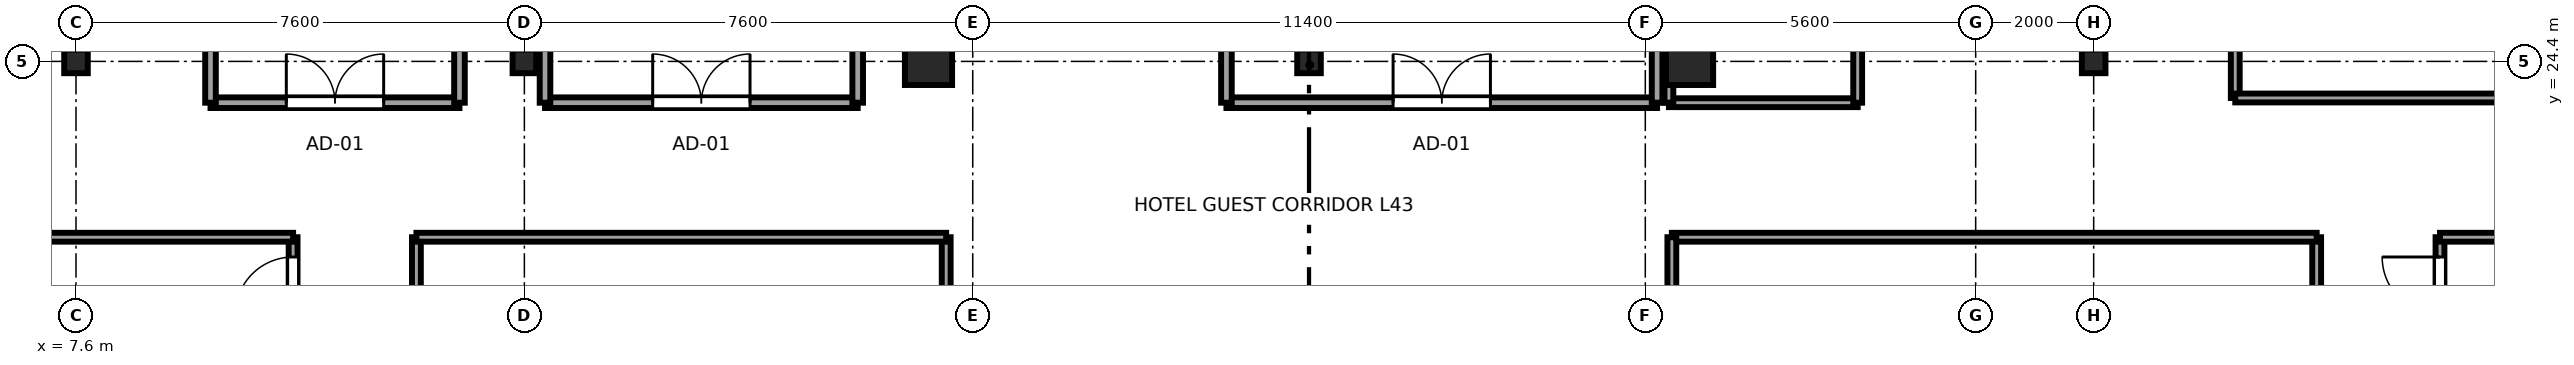
"""IFC4 building model, lengths in metres.
Left out: names, types, materials, properties, quantities, classifications, styles, units other than length and angle.
Written with IfcOpenShell. Run it as: python <this file> out.ifc"""

import sys

from ifc_helpers import new_model, si_unit, direction, frame, frame_2d, origin, origin_2d, place, context, subcontext, project, spatial, rectangle, i_section, extrude, source, transform, mapped, element, fill, save


model = new_model("IFC4")
c1 = context("Model", 3, precision=1e-05, world=origin(), true_north=direction((0.0, 1.0)))
c2 = subcontext(c1, "Body", "Model", "MODEL_VIEW")
j1 = project(units=[si_unit("LENGTHUNIT", "METRE"), si_unit("PLANEANGLEUNIT", "RADIAN")], contexts=[c1])
p1 = place(None, origin())
s1 = spatial("IfcSite", under=j1, at=p1, CompositionType="ELEMENT")
p2 = place(p1, origin())
s2 = spatial("IfcBuilding", under=s1, at=p2, CompositionType="ELEMENT")
p3 = place(p2, frame((0.0, 0.0, 164.8)))
s3 = spatial("IfcBuildingStorey", under=s2, at=p3, CompositionType="ELEMENT", Elevation=164.8)
m1 = source(origin(), c2, "Body", "SweptSolid", [
    extrude(i_section(OverallWidth=0.4, OverallDepth=0.4, WebThickness=0.02, FlangeThickness=0.035, at=origin_2d()), origin(), (0.0, 0.0, 1.0), 3.55),
])
for number, where, z_axis, x_axis in (
    (1, (7.6, 24.4, 0.0), (0.0, 0.0, 1.0), (1.0, 0.0, 0.0)),
    (2, (15.2, 24.4, 0.0), (0.0, 0.0, 1.0), (1.0, 0.0, 0.0)),
):
    element("IfcColumn", number, at=place(p3, frame(where, z_axis=z_axis, x_axis=x_axis)), inside=s3, PredefinedType="COLUMN", context=c2, shape_type="MappedRepresentation", body=[
        mapped(m1, transform((0.0, 0.0, 0.0), x_axis=(1.0, 0.0, 0.0), y_axis=(0.0, 1.0, 0.0), z_axis=(0.0, 0.0, 1.0), scale=1.0)),
    ])
m2 = source(origin(), c2, "Body", "SweptSolid", [
    extrude(rectangle(XDim=0.8, YDim=0.8, at=origin_2d()), origin(), (0.0, 0.0, 1.0), 3.55),
])
for number, where, z_axis, x_axis in (
    (3, (22.05, 24.4, 0.0), (0.0, 0.0, 1.0), (1.0, 0.0, 0.0)),
    (4, (34.95, 24.4, 0.0), (0.0, 0.0, 1.0), (1.0, 0.0, 0.0)),
):
    element("IfcColumn", number, at=place(p3, frame(where, z_axis=z_axis, x_axis=x_axis)), inside=s3, PredefinedType="COLUMN", context=c2, shape_type="MappedRepresentation", body=[
        mapped(m2, transform((0.0, 0.0, 0.0), x_axis=(1.0, 0.0, 0.0), y_axis=(0.0, 1.0, 0.0), z_axis=(0.0, 0.0, 1.0), scale=1.0)),
    ])
for number, where, z_axis, x_axis in (
    (5, (41.8, 24.4, 0.0), (0.0, 0.0, 1.0), (1.0, 0.0, 0.0)),
    (6, (28.5, 24.4, 0.0), (0.0, 0.0, 1.0), (1.0, 0.0, 0.0)),
):
    element("IfcColumn", number, at=place(p3, frame(where, z_axis=z_axis, x_axis=x_axis)), inside=s3, PredefinedType="COLUMN", context=c2, shape_type="MappedRepresentation", body=[
        mapped(m1, transform((0.0, 0.0, 0.0), x_axis=(1.0, 0.0, 0.0), y_axis=(0.0, 1.0, 0.0), z_axis=(0.0, 0.0, 1.0), scale=1.0)),
    ])
p4 = place(p3, frame((11.28, 19.81, 0.0), z_axis=(0.0, 0.0, 1.0), x_axis=(0.0, 1.0, 0.0)))
e7 = element("IfcWall", 7, at=p4, inside=s3, PredefinedType="PARTITIONING", context=c2, shape_type="SweptSolid", body=[
    extrude(rectangle(XDim=1.61, YDim=0.15, at=frame_2d((0.805, 0.0))), origin(), (0.0, 0.0, 1.0), 3.001),
])
p5 = place(p4, frame((0.295, 0.0, 0.0)))
e8 = element("IfcOpeningElement", 8, at=p5, cuts=e7, PredefinedType="OPENING", context=c2, shape_type="SweptSolid", body=[
    extrude(rectangle(XDim=0.98, YDim=2.12, at=frame_2d((0.49, 1.06))), frame((0.0, 0.085, 0.0), z_axis=(0.0, -1.0, 0.0), x_axis=(1.0, 0.0, 0.0)), (0.0, 0.0, 1.0), 0.17),
])
p6 = place(p3, frame((3.005, 21.42, 0.0), z_axis=(0.0, 0.0, 1.0), x_axis=(1.0, 0.0, 0.0)))
e9 = element("IfcWall", 9, at=p6, inside=s3, PredefinedType="PARTITIONING", context=c2, shape_type="SweptSolid", body=[
    extrude(rectangle(XDim=8.275, YDim=0.15, at=frame_2d((4.138, 0.0))), origin(), (0.0, 0.0, 1.0), 3.37),
])
p7 = place(p3, frame((13.37, 18.81, 0.0), z_axis=(0.0, 0.0, 1.0), x_axis=(0.0, 1.0, 0.0)))
e10 = element("IfcWall", 10, at=p7, inside=s3, PredefinedType="PARTITIONING", context=c2, shape_type="SweptSolid", body=[
    extrude(rectangle(XDim=2.61, YDim=0.15, at=frame_2d((1.305, 0.0))), origin(), (0.0, 0.0, 1.0), 3.37),
])
p8 = place(p7, frame((0.795, 0.0, 0.0)))
e11 = element("IfcOpeningElement", 11, at=p8, cuts=e10, PredefinedType="OPENING", context=c2, shape_type="SweptSolid", body=[
    extrude(rectangle(XDim=0.98, YDim=2.12, at=frame_2d((0.49, 1.06))), frame((0.0, 0.085, 0.0), z_axis=(0.0, -1.0, 0.0), x_axis=(1.0, 0.0, 0.0)), (0.0, 0.0, 1.0), 0.17),
])
p9 = place(p3, frame((22.35, 16.88, 0.0), z_axis=(0.0, 0.0, 1.0), x_axis=(0.0, 1.0, 0.0)))
e12 = element("IfcWall", 12, at=p9, inside=s3, PredefinedType="PARTITIONING", context=c2, shape_type="SweptSolid", body=[
    extrude(rectangle(XDim=4.54, YDim=0.15, at=frame_2d((2.27, 0.0))), origin(), (0.0, 0.0, 1.0), 3.37),
])
p10 = place(p3, frame((13.37, 21.42, 0.0), z_axis=(0.0, 0.0, 1.0), x_axis=(1.0, 0.0, 0.0)))
e13 = element("IfcWall", 13, at=p10, inside=s3, PredefinedType="PARTITIONING", context=c2, shape_type="SweptSolid", body=[
    extrude(rectangle(XDim=8.98, YDim=0.15, at=frame_2d((4.49, 0.0))), origin(), (0.0, 0.0, 1.0), 3.37),
])
p11 = place(p3, frame((45.58, 18.81, 0.0), z_axis=(0.0, 0.0, 1.0), x_axis=(0.0, 1.0, 0.0)))
e14 = element("IfcWall", 14, at=p11, inside=s3, PredefinedType="PARTITIONING", context=c2, shape_type="SweptSolid", body=[
    extrude(rectangle(XDim=2.61, YDim=0.15, at=frame_2d((1.305, 0.0))), origin(), (0.0, 0.0, 1.0), 3.001),
])
p12 = place(p11, frame((0.795, 0.0, 0.0)))
e15 = element("IfcOpeningElement", 15, at=p12, cuts=e14, PredefinedType="OPENING", context=c2, shape_type="SweptSolid", body=[
    extrude(rectangle(XDim=0.98, YDim=2.12, at=frame_2d((0.49, 1.06))), frame((0.0, 0.085, 0.0), z_axis=(0.0, -1.0, 0.0), x_axis=(1.0, 0.0, 0.0)), (0.0, 0.0, 1.0), 0.17),
])
p13 = place(p3, frame((34.65, 21.42, 0.0), z_axis=(0.0, 0.0, 1.0), x_axis=(1.0, 0.0, 0.0)))
e16 = element("IfcWall", 16, at=p13, inside=s3, PredefinedType="PARTITIONING", context=c2, shape_type="SweptSolid", body=[
    extrude(rectangle(XDim=10.93, YDim=0.15, at=frame_2d((5.465, 0.0))), origin(), (0.0, 0.0, 1.0), 3.37),
])
p14 = place(p3, frame((34.65, 16.88, 0.0), z_axis=(0.0, 0.0, 1.0), x_axis=(0.0, 1.0, 0.0)))
e17 = element("IfcWall", 17, at=p14, inside=s3, PredefinedType="PARTITIONING", context=c2, shape_type="SweptSolid", body=[
    extrude(rectangle(XDim=4.54, YDim=0.15, at=frame_2d((2.27, 0.0))), origin(), (0.0, 0.0, 1.0), 3.37),
])
p15 = place(p3, frame((47.67, 19.81, 0.0), z_axis=(0.0, 0.0, 1.0), x_axis=(0.0, 1.0, 0.0)))
e18 = element("IfcWall", 18, at=p15, inside=s3, PredefinedType="PARTITIONING", context=c2, shape_type="SweptSolid", body=[
    extrude(rectangle(XDim=1.61, YDim=0.15, at=frame_2d((0.805, 0.0))), origin(), (0.0, 0.0, 1.0), 3.37),
])
p16 = place(p15, frame((0.295, 0.0, 0.0)))
e19 = element("IfcOpeningElement", 19, at=p16, cuts=e18, PredefinedType="OPENING", context=c2, shape_type="SweptSolid", body=[
    extrude(rectangle(XDim=0.98, YDim=2.12, at=frame_2d((0.49, 1.06))), frame((0.0, 0.085, 0.0), z_axis=(0.0, -1.0, 0.0), x_axis=(1.0, 0.0, 0.0)), (0.0, 0.0, 1.0), 0.17),
])
p17 = place(p3, frame((47.67, 21.42, 0.0), z_axis=(0.0, 0.0, 1.0), x_axis=(1.0, 0.0, 0.0)))
e20 = element("IfcWall", 20, at=p17, inside=s3, PredefinedType="PARTITIONING", context=c2, shape_type="SweptSolid", body=[
    extrude(rectangle(XDim=6.325, YDim=0.15, at=frame_2d((3.163, 0.0))), origin(), (0.0, 0.0, 1.0), 3.37),
])
p18 = place(p3, frame((44.2, 23.78, 0.0), z_axis=(0.0, 0.0, 1.0), x_axis=(0.0, 1.0, 0.0)))
e21 = element("IfcWall", 21, at=p18, inside=s3, PredefinedType="PARTITIONING", context=c2, shape_type="SweptSolid", body=[
    extrude(rectangle(XDim=7.34, YDim=0.15, at=frame_2d((3.67, 0.0))), origin(), (0.0, 0.0, 1.0), 3.37),
])
p19 = place(p18, frame((3.18, 0.0, 0.0)))
e22 = element("IfcOpeningElement", 22, at=p19, cuts=e21, PredefinedType="OPENING", context=c2, shape_type="SweptSolid", body=[
    extrude(rectangle(XDim=0.98, YDim=2.12, at=frame_2d((0.49, 1.06))), frame((0.0, 0.085, 0.0), z_axis=(0.0, -1.0, 0.0), x_axis=(1.0, 0.0, 0.0)), (0.0, 0.0, 1.0), 0.17),
])
p20 = place(p3, frame((44.2, 23.78, 0.0), z_axis=(0.0, 0.0, 1.0), x_axis=(1.0, 0.0, 0.0)))
e23 = element("IfcWall", 23, at=p20, inside=s3, PredefinedType="PARTITIONING", context=c2, shape_type="SweptSolid", body=[
    extrude(rectangle(XDim=9.795, YDim=0.15, at=frame_2d((4.897, 0.0))), origin(), (0.0, 0.0, 1.0), 3.37),
])
p21 = place(p3, frame((9.88, 23.7, 0.0), z_axis=(0.0, 0.0, 1.0), x_axis=(1.0, 0.0, 0.0)))
e24 = element("IfcWall", 24, at=p21, inside=s3, PredefinedType="PARTITIONING", context=c2, shape_type="SweptSolid", body=[
    extrude(rectangle(XDim=4.22, YDim=0.18, at=frame_2d((2.11, 0.0))), origin(), (0.0, 0.0, 1.0), 3.37),
])
p22 = place(p21, frame((1.285, 0.0, 0.0)))
e25 = element("IfcOpeningElement", 25, at=p22, cuts=e24, PredefinedType="OPENING", context=c2, shape_type="SweptSolid", body=[
    extrude(rectangle(XDim=1.65, YDim=2.15, at=frame_2d((0.825, 1.075))), frame((0.0, 0.1, 0.0), z_axis=(0.0, -1.0, 0.0), x_axis=(1.0, 0.0, 0.0)), (0.0, 0.0, 1.0), 0.2),
])
for number, where, z_axis, x_axis in (
    (26, (9.88, 23.7, 0.0), (0.0, 0.0, 1.0), (0.0, 1.0, 0.0)),
    (27, (14.1, 23.7, 0.0), (0.0, 0.0, 1.0), (0.0, 1.0, 0.0)),
):
    element("IfcWall", number, at=place(p3, frame(where, z_axis=z_axis, x_axis=x_axis)), inside=s3, PredefinedType="PARTITIONING", context=c2, shape_type="SweptSolid", body=[
        extrude(rectangle(XDim=6.05, YDim=0.18, at=frame_2d((3.025, 0.0))), origin(), (0.0, 0.0, 1.0), 3.37),
    ])
p23 = place(p3, frame((27.1, 23.7, 0.0), z_axis=(0.0, 0.0, 1.0), x_axis=(1.0, 0.0, 0.0)))
e28 = element("IfcWall", 28, at=p23, inside=s3, PredefinedType="PARTITIONING", context=c2, shape_type="SweptSolid", body=[
    extrude(rectangle(XDim=7.3, YDim=0.18, at=frame_2d((3.65, 0.0))), origin(), (0.0, 0.0, 1.0), 3.37),
])
p24 = place(p23, frame((2.825, 0.0, 0.0)))
e29 = element("IfcOpeningElement", 29, at=p24, cuts=e28, PredefinedType="OPENING", context=c2, shape_type="SweptSolid", body=[
    extrude(rectangle(XDim=1.65, YDim=2.15, at=frame_2d((0.825, 1.075))), frame((0.0, 0.1, 0.0), z_axis=(0.0, -1.0, 0.0), x_axis=(1.0, 0.0, 0.0)), (0.0, 0.0, 1.0), 0.2),
])
for number, where, z_axis, x_axis in (
    (30, (27.1, 23.7, 0.0), (0.0, 0.0, 1.0), (0.0, 1.0, 0.0)),
    (31, (34.4, 23.7, 0.0), (0.0, 0.0, 1.0), (0.0, 1.0, 0.0)),
):
    element("IfcWall", number, at=place(p3, frame(where, z_axis=z_axis, x_axis=x_axis)), inside=s3, PredefinedType="PARTITIONING", context=c2, shape_type="SweptSolid", body=[
        extrude(rectangle(XDim=6.1, YDim=0.18, at=frame_2d((3.05, 0.0))), origin(), (0.0, 0.0, 1.0), 3.37),
    ])
p25 = place(p3, frame((15.55, 23.7, 0.0), z_axis=(0.0, 0.0, 1.0), x_axis=(1.0, 0.0, 0.0)))
e32 = element("IfcWall", 32, at=p25, inside=s3, PredefinedType="PARTITIONING", context=c2, shape_type="SweptSolid", body=[
    extrude(rectangle(XDim=5.3, YDim=0.18, at=frame_2d((2.65, 0.0))), origin(), (0.0, 0.0, 1.0), 3.37),
])
p26 = place(p25, frame((1.825, 0.0, 0.0)))
e33 = element("IfcOpeningElement", 33, at=p26, cuts=e32, PredefinedType="OPENING", context=c2, shape_type="SweptSolid", body=[
    extrude(rectangle(XDim=1.65, YDim=2.15, at=frame_2d((0.825, 1.075))), frame((0.0, 0.1, 0.0), z_axis=(0.0, -1.0, 0.0), x_axis=(1.0, 0.0, 0.0)), (0.0, 0.0, 1.0), 0.2),
])
for number, where, z_axis, x_axis in (
    (34, (15.55, 23.7, 0.0), (0.0, 0.0, 1.0), (0.0, 1.0, 0.0)),
    (35, (20.85, 23.7, 0.0), (0.0, 0.0, 1.0), (0.0, 1.0, 0.0)),
):
    element("IfcWall", number, at=place(p3, frame(where, z_axis=z_axis, x_axis=x_axis)), inside=s3, PredefinedType="PARTITIONING", context=c2, shape_type="SweptSolid", body=[
        extrude(rectangle(XDim=6.1, YDim=0.18, at=frame_2d((3.05, 0.0))), origin(), (0.0, 0.0, 1.0), 3.37),
    ])
p27 = place(p3, frame((34.6, 23.7, 0.0), z_axis=(0.0, 0.0, 1.0), x_axis=(1.0, 0.0, 0.0)))
e36 = element("IfcWall", 36, at=p27, inside=s3, PredefinedType="PARTITIONING", context=c2, shape_type="SweptSolid", body=[
    extrude(rectangle(XDim=3.2, YDim=0.15, at=frame_2d((1.6, 0.0))), origin(), (0.0, 0.0, 1.0), 3.37),
])
for number, where, z_axis, x_axis in (
    (37, (34.6, 23.7, 0.0), (0.0, 0.0, 1.0), (0.0, 1.0, 0.0)),
    (38, (37.8, 23.7, 0.0), (0.0, 0.0, 1.0), (0.0, 1.0, 0.0)),
):
    element("IfcWall", number, at=place(p3, frame(where, z_axis=z_axis, x_axis=x_axis)), inside=s3, PredefinedType="PARTITIONING", context=c2, shape_type="SweptSolid", body=[
        extrude(rectangle(XDim=5.7, YDim=0.15, at=frame_2d((2.85, 0.0))), origin(), (0.0, 0.0, 1.0), 3.37),
    ])
m3 = source(origin(), c2, "Body", "SweptSolid", [
    extrude(rectangle(XDim=0.98, YDim=2.12, at=frame_2d((0.49, 1.06))), frame((0.0, 0.025, 0.0), z_axis=(0.0, -1.0, 0.0), x_axis=(1.0, 0.0, 0.0)), (0.0, 0.0, 1.0), 0.05),
])
p28 = place(p5, origin())
e39 = element("IfcDoor", 39, at=p28, inside=s3, OperationType="SINGLE_SWING_LEFT", PredefinedType="DOOR", context=c2, shape_type="MappedRepresentation", body=[
    mapped(m3, transform((0.0, 0.0, 0.0), x_axis=(1.0, 0.0, 0.0), y_axis=(0.0, 1.0, 0.0), z_axis=(0.0, 0.0, 1.0), scale=1.0)),
])
fill(e8, e39)
p29 = place(p16, origin())
e40 = element("IfcDoor", 40, at=p29, inside=s3, OperationType="SINGLE_SWING_RIGHT", PredefinedType="DOOR", context=c2, shape_type="MappedRepresentation", body=[
    mapped(m3, transform((0.0, 0.0, 0.0), x_axis=(1.0, 0.0, 0.0), y_axis=(0.0, 1.0, 0.0), z_axis=(0.0, 0.0, 1.0), scale=1.0)),
])
fill(e19, e40)
m4 = source(origin(), c2, "Body", "SweptSolid", [
    extrude(rectangle(XDim=1.65, YDim=2.15, at=frame_2d((0.825, 1.075))), frame((0.0, 0.025, 0.0), z_axis=(0.0, -1.0, 0.0), x_axis=(1.0, 0.0, 0.0)), (0.0, 0.0, 1.0), 0.05),
])
p30 = place(p22, origin())
e41 = element("IfcDoor", 41, at=p30, inside=s3, OperationType="DOUBLE_DOOR_SINGLE_SWING", PredefinedType="DOOR", context=c2, shape_type="MappedRepresentation", body=[
    mapped(m4, transform((0.0, 0.0, 0.0), x_axis=(1.0, 0.0, 0.0), y_axis=(0.0, 1.0, 0.0), z_axis=(0.0, 0.0, 1.0), scale=1.0)),
])
fill(e25, e41)
p31 = place(p24, origin())
e42 = element("IfcDoor", 42, at=p31, inside=s3, OperationType="DOUBLE_DOOR_SINGLE_SWING", PredefinedType="DOOR", context=c2, shape_type="MappedRepresentation", body=[
    mapped(m4, transform((0.0, 0.0, 0.0), x_axis=(1.0, 0.0, 0.0), y_axis=(0.0, 1.0, 0.0), z_axis=(0.0, 0.0, 1.0), scale=1.0)),
])
fill(e29, e42)
p32 = place(p26, origin())
e43 = element("IfcDoor", 43, at=p32, inside=s3, OperationType="DOUBLE_DOOR_SINGLE_SWING", PredefinedType="DOOR", context=c2, shape_type="MappedRepresentation", body=[
    mapped(m4, transform((0.0, 0.0, 0.0), x_axis=(1.0, 0.0, 0.0), y_axis=(0.0, 1.0, 0.0), z_axis=(0.0, 0.0, 1.0), scale=1.0)),
])
fill(e33, e43)
save(model, sys.argv[1])
